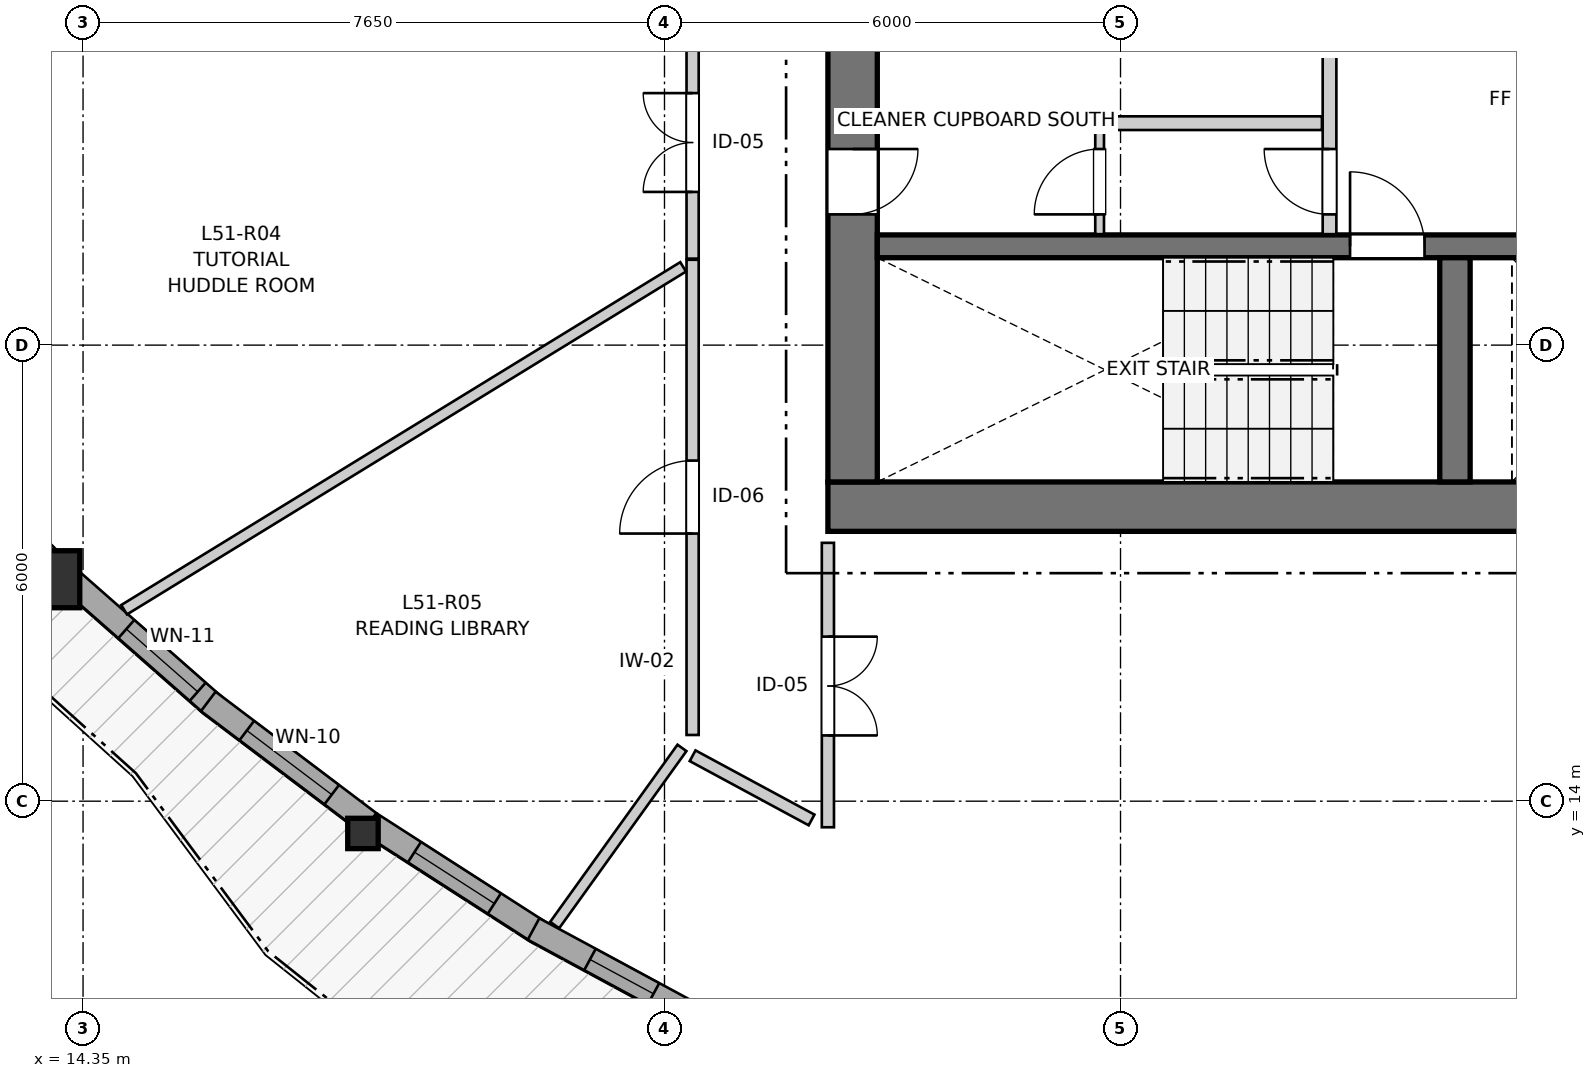
"""IFC4 building model, lengths in metres.
Left out: names, types, materials, properties, quantities, classifications, styles, units other than length and angle.
Written with IfcOpenShell. Run it as: python <this file> out.ifc"""

import sys

from ifc_helpers import new_model, si_unit, direction, frame, frame_2d, origin, origin_2d, place, context, subcontext, project, spatial, rectangle, i_section, extrude, source, transform, mapped, element, fill, save


model = new_model("IFC4")
c1 = context("Model", 3, precision=1e-05, world=origin(), true_north=direction((0.0, 1.0)))
c2 = subcontext(c1, "Body", "Model", "MODEL_VIEW")
j1 = project(units=[si_unit("LENGTHUNIT", "METRE"), si_unit("PLANEANGLEUNIT", "RADIAN")], contexts=[c1])
p1 = place(None, origin())
s1 = spatial("IfcSite", under=j1, at=p1, CompositionType="ELEMENT")
p2 = place(p1, origin())
s2 = spatial("IfcBuilding", under=s1, at=p2, CompositionType="ELEMENT")
p3 = place(p2, frame((0.0, 0.0, 171.4)))
s3 = spatial("IfcBuildingStorey", under=s2, at=p3, CompositionType="ELEMENT", Elevation=171.4)
p4 = place(p3, frame((24.15, 17.875, 0.0), z_axis=(0.0, 0.0, 1.0), x_axis=(1.0, 0.0, 0.0)))
e1 = element("IfcWall", 1, at=p4, inside=s3, PredefinedType="SHEAR", context=c2, shape_type="SweptSolid", body=[
    extrude(rectangle(XDim=12.4, YDim=0.65, at=frame_2d((6.2, 0.0))), origin(), (0.0, 0.0, 1.0), 2.95),
])
p5 = place(p3, frame((24.475, 33.8, 0.0), z_axis=(0.0, 0.0, 1.0), x_axis=(0.0, -1.0, 0.0)))
e2 = element("IfcWall", 2, at=p5, inside=s3, PredefinedType="SHEAR", context=c2, shape_type="SweptSolid", body=[
    extrude(rectangle(XDim=15.6, YDim=0.65, at=frame_2d((7.8, 0.0))), origin(), (0.0, 0.0, 1.0), 2.95),
])
p6 = place(p5, frame((7.05, 0.0, 0.0)))
e3 = element("IfcOpeningElement", 3, at=p6, cuts=e2, PredefinedType="OPENING", context=c2, shape_type="SweptSolid", body=[
    extrude(rectangle(XDim=1.5, YDim=2.15, at=frame_2d((0.75, 1.075))), frame((0.0, 0.335, 0.0), z_axis=(0.0, -1.0, 0.0), x_axis=(1.0, 0.0, 0.0)), (0.0, 0.0, 1.0), 0.67),
])
p7 = place(p5, frame((3.52, 0.0, 0.0)))
e4 = element("IfcOpeningElement", 4, at=p7, cuts=e2, PredefinedType="OPENING", context=c2, shape_type="SweptSolid", body=[
    extrude(rectangle(XDim=0.86, YDim=2.05, at=frame_2d((0.43, 1.025))), frame((0.0, 0.335, 0.0), z_axis=(0.0, -1.0, 0.0), x_axis=(1.0, 0.0, 0.0)), (0.0, 0.0, 1.0), 0.67),
])
p8 = place(p5, frame((11.22, 0.0, 0.0)))
e5 = element("IfcOpeningElement", 5, at=p8, cuts=e2, PredefinedType="OPENING", context=c2, shape_type="SweptSolid", body=[
    extrude(rectangle(XDim=0.86, YDim=2.05, at=frame_2d((0.43, 1.025))), frame((0.0, 0.335, 0.0), z_axis=(0.0, -1.0, 0.0), x_axis=(1.0, 0.0, 0.0)), (0.0, 0.0, 1.0), 0.67),
])
p9 = place(p3, frame((24.8, 21.3, 0.0), z_axis=(0.0, 0.0, 1.0), x_axis=(1.0, 0.0, 0.0)))
e6 = element("IfcWall", 6, at=p9, inside=s3, PredefinedType="SHEAR", context=c2, shape_type="SweptSolid", body=[
    extrude(rectangle(XDim=11.1, YDim=0.3, at=frame_2d((5.55, 0.0))), origin(), (0.0, 0.0, 1.0), 2.95),
])
p10 = place(p9, frame((6.22, 0.0, 0.0)))
e7 = element("IfcOpeningElement", 7, at=p10, cuts=e6, PredefinedType="OPENING", context=c2, shape_type="SweptSolid", body=[
    extrude(rectangle(XDim=0.98, YDim=2.15, at=frame_2d((0.49, 1.075))), frame((0.0, 0.16, 0.0), z_axis=(0.0, -1.0, 0.0), x_axis=(1.0, 0.0, 0.0)), (0.0, 0.0, 1.0), 0.32),
])
p11 = place(p9, frame((9.15, 0.0, 0.0)))
e8 = element("IfcOpeningElement", 8, at=p11, cuts=e6, PredefinedType="OPENING", context=c2, shape_type="SweptSolid", body=[
    extrude(rectangle(XDim=1.15, YDim=2.15, at=frame_2d((0.575, 1.075))), frame((0.0, 0.16, 0.0), z_axis=(0.0, -1.0, 0.0), x_axis=(1.0, 0.0, 0.0)), (0.0, 0.0, 1.0), 0.32),
])
p12 = place(p3, frame((32.4, 18.2, 0.0), z_axis=(0.0, 0.0, 1.0), x_axis=(0.0, 1.0, 0.0)))
e9 = element("IfcWall", 9, at=p12, inside=s3, PredefinedType="SHEAR", context=c2, shape_type="SweptSolid", body=[
    extrude(rectangle(XDim=2.95, YDim=0.4, at=frame_2d((1.475, 0.0))), origin(), (0.0, 0.0, 1.0), 2.95),
])
m1 = source(origin(), c2, "Body", "SweptSolid", [
    extrude(rectangle(XDim=0.75, YDim=0.75, at=origin_2d()), origin(), (0.0, 0.0, 1.0), 2.95),
])
p13 = place(p3, frame((13.932, 16.92, 0.0), z_axis=(0.0, 0.0, 1.0), x_axis=(1.0, 0.0, 0.0)))
e10 = element("IfcColumn", 10, at=p13, inside=s3, PredefinedType="COLUMN", context=c2, shape_type="MappedRepresentation", body=[
    mapped(m1, transform((0.0, 0.0, 0.0), x_axis=(1.0, 0.0, 0.0), y_axis=(0.0, 1.0, 0.0), z_axis=(0.0, 0.0, 1.0), scale=1.0)),
])
m2 = source(origin(), c2, "Body", "SweptSolid", [
    extrude(i_section(OverallWidth=0.401, OverallDepth=0.399, WebThickness=0.023, FlangeThickness=0.036, FilletRadius=0.015, at=origin_2d()), origin(), (0.0, 0.0, 1.0), 2.95),
])
p14 = place(p3, frame((18.033, 13.575, 0.0), z_axis=(0.0, 0.0, 1.0), x_axis=(1.0, 0.0, 0.0)))
e11 = element("IfcColumn", 11, at=p14, inside=s3, PredefinedType="PILASTER", context=c2, shape_type="MappedRepresentation", body=[
    mapped(m2, transform((0.0, 0.0, 0.0), x_axis=(1.0, 0.0, 0.0), y_axis=(0.0, 1.0, 0.0), z_axis=(0.0, 0.0, 1.0), scale=1.0)),
])
p15 = place(p3, frame((12.12, 18.989, 0.0), z_axis=(0.0, 0.0, 1.0), x_axis=(0.701501494422, -0.71266798253, 0.0)))
e12 = element("IfcWall", 12, at=p15, inside=s3, PredefinedType="SOLIDWALL", context=c2, shape_type="SweptSolid", body=[
    extrude(rectangle(XDim=2.58, YDim=0.32, at=frame_2d((1.29, 0.0))), origin(), (0.0, 0.0, 1.0), 2.53),
])
p16 = place(p15, frame((0.795, 0.0, 0.0)))
e13 = element("IfcOpeningElement", 13, at=p16, cuts=e12, PredefinedType="OPENING", context=c2, shape_type="SweptSolid", body=[
    extrude(rectangle(XDim=1.0, YDim=2.1, at=frame_2d((0.5, 1.05))), frame((0.0, 0.17, 0.0), z_axis=(0.0, -1.0, 0.0), x_axis=(1.0, 0.0, 0.0)), (0.0, 0.0, 1.0), 0.34),
])
p17 = place(p3, frame((14.161, 16.931, 0.0), z_axis=(0.0, 0.0, 1.0), x_axis=(0.751131625517, -0.660152468107, 0.0)))
e14 = element("IfcWall", 14, at=p17, inside=s3, PredefinedType="SOLIDWALL", context=c2, shape_type="SweptSolid", body=[
    extrude(rectangle(XDim=2.536, YDim=0.32, at=frame_2d((1.268, 0.0))), origin(), (0.0, 0.0, 1.0), 2.53),
])
p18 = place(p17, frame((1.01, 0.0, 0.82)))
e15 = element("IfcOpeningElement", 15, at=p18, cuts=e14, PredefinedType="OPENING", context=c2, shape_type="SweptSolid", body=[
    extrude(rectangle(XDim=1.25, YDim=1.35, at=frame_2d((0.625, 0.675))), frame((0.0, 0.17, 0.0), z_axis=(0.0, -1.0, 0.0), x_axis=(1.0, 0.0, 0.0)), (0.0, 0.0, 1.0), 0.34),
])
p19 = place(p3, frame((15.998, 15.313, 0.0), z_axis=(0.0, 0.0, 1.0), x_axis=(0.797995270696, -0.602663710494, 0.0)))
e16 = element("IfcWall", 16, at=p19, inside=s3, PredefinedType="SOLIDWALL", context=c2, shape_type="SweptSolid", body=[
    extrude(rectangle(XDim=2.651, YDim=0.32, at=frame_2d((1.325, 0.0))), origin(), (0.0, 0.0, 1.0), 2.53),
])
p20 = place(p19, frame((0.635, 0.0, 0.82)))
e17 = element("IfcOpeningElement", 17, at=p20, cuts=e16, PredefinedType="OPENING", context=c2, shape_type="SweptSolid", body=[
    extrude(rectangle(XDim=1.4, YDim=1.35, at=frame_2d((0.7, 0.675))), frame((0.0, 0.17, 0.0), z_axis=(0.0, -1.0, 0.0), x_axis=(1.0, 0.0, 0.0)), (0.0, 0.0, 1.0), 0.34),
])
p21 = place(p3, frame((18.136, 13.699, 0.0), z_axis=(0.0, 0.0, 1.0), x_axis=(0.841223609804, -0.540687375761, 0.0)))
e18 = element("IfcWall", 18, at=p21, inside=s3, PredefinedType="SOLIDWALL", context=c2, shape_type="SweptSolid", body=[
    extrude(rectangle(XDim=2.636, YDim=0.32, at=frame_2d((1.318, 0.0))), origin(), (0.0, 0.0, 1.0), 2.53),
])
p22 = place(p21, frame((0.683, 0.0, 0.82)))
e19 = element("IfcOpeningElement", 19, at=p22, cuts=e18, PredefinedType="OPENING", context=c2, shape_type="SweptSolid", body=[
    extrude(rectangle(XDim=1.25, YDim=1.35, at=frame_2d((0.625, 0.675))), frame((0.0, 0.17, 0.0), z_axis=(0.0, -1.0, 0.0), x_axis=(1.0, 0.0, 0.0)), (0.0, 0.0, 1.0), 0.34),
])
p23 = place(p3, frame((20.278, 12.319, 0.0), z_axis=(0.0, 0.0, 1.0), x_axis=(0.879825062943, -0.475297652653, 0.0)))
e20 = element("IfcWall", 20, at=p23, inside=s3, PredefinedType="SOLIDWALL", context=c2, shape_type="SweptSolid", body=[
    extrude(rectangle(XDim=2.491, YDim=0.32, at=frame_2d((1.245, 0.0))), origin(), (0.0, 0.0, 1.0), 2.53),
])
p24 = place(p23, frame((0.844, 0.0, 0.82)))
e21 = element("IfcOpeningElement", 21, at=p24, cuts=e20, PredefinedType="OPENING", context=c2, shape_type="SweptSolid", body=[
    extrude(rectangle(XDim=0.95, YDim=1.35, at=frame_2d((0.475, 0.675))), frame((0.0, 0.17, 0.0), z_axis=(0.0, -1.0, 0.0), x_axis=(1.0, 0.0, 0.0)), (0.0, 0.0, 1.0), 0.34),
])
p25 = place(p3, frame((30.75, 21.46, 0.0), z_axis=(0.0, 0.0, 1.0), x_axis=(0.0, 1.0, 0.0)))
e22 = element("IfcWall", 22, at=p25, inside=s3, PredefinedType="PARTITIONING", context=c2, shape_type="SweptSolid", body=[
    extrude(rectangle(XDim=3.11, YDim=0.18, at=frame_2d((1.555, 0.0))), origin(), (0.0, 0.0, 1.0), 2.95),
])
p26 = place(p25, frame((0.26, 0.0, 0.0)))
e23 = element("IfcOpeningElement", 23, at=p26, cuts=e22, PredefinedType="OPENING", context=c2, shape_type="SweptSolid", body=[
    extrude(rectangle(XDim=0.86, YDim=2.05, at=frame_2d((0.43, 1.025))), frame((0.0, 0.1, 0.0), z_axis=(0.0, -1.0, 0.0), x_axis=(1.0, 0.0, 0.0)), (0.0, 0.0, 1.0), 0.2),
])
p27 = place(p3, frame((24.81, 22.92, 0.0), z_axis=(0.0, 0.0, 1.0), x_axis=(1.0, 0.0, 0.0)))
e24 = element("IfcWall", 24, at=p27, inside=s3, PredefinedType="PARTITIONING", context=c2, shape_type="SweptSolid", body=[
    extrude(rectangle(XDim=5.84, YDim=0.18, at=frame_2d((2.92, 0.0))), origin(), (0.0, 0.0, 1.0), 2.95),
])
p28 = place(p3, frame((27.725, 21.46, 0.0), z_axis=(0.0, 0.0, 1.0), x_axis=(0.0, 1.0, 0.0)))
e25 = element("IfcWall", 25, at=p28, inside=s3, PredefinedType="PARTITIONING", context=c2, shape_type="SweptSolid", body=[
    extrude(rectangle(XDim=1.38, YDim=0.115, at=frame_2d((0.69, 0.0))), origin(), (0.0, 0.0, 1.0), 2.95),
])
p29 = place(p28, frame((0.26, 0.0, 0.0)))
e26 = element("IfcOpeningElement", 26, at=p29, cuts=e25, PredefinedType="OPENING", context=c2, shape_type="SweptSolid", body=[
    extrude(rectangle(XDim=0.86, YDim=2.05, at=frame_2d((0.43, 1.025))), frame((0.0, 0.067, 0.0), z_axis=(0.0, -1.0, 0.0), x_axis=(1.0, 0.0, 0.0)), (0.0, 0.0, 1.0), 0.135),
])
p30 = place(p3, frame((22.37, 14.871, 0.0), z_axis=(0.0, 0.0, 1.0), x_axis=(0.0, 1.0, 0.0)))
e27 = element("IfcWall", 27, at=p30, inside=s3, PredefinedType="PARTITIONING", context=c2, shape_type="SweptSolid", body=[
    extrude(rectangle(XDim=6.252, YDim=0.16, at=frame_2d((3.126, 0.0))), origin(), (0.0, 0.0, 1.0), 2.95),
])
p31 = place(p30, frame((2.65, 0.0, 0.0)))
e28 = element("IfcOpeningElement", 28, at=p31, cuts=e27, PredefinedType="OPENING", context=c2, shape_type="SweptSolid", body=[
    extrude(rectangle(XDim=0.96, YDim=2.1, at=frame_2d((0.48, 1.05))), frame((0.0, 0.09, 0.0), z_axis=(0.0, -1.0, 0.0), x_axis=(1.0, 0.0, 0.0)), (0.0, 0.0, 1.0), 0.18),
])
p32 = place(p3, frame((24.15, 17.399, 0.0), z_axis=(0.0, 0.0, 1.0), x_axis=(0.0, -1.0, 0.0)))
e29 = element("IfcWall", 29, at=p32, inside=s3, PredefinedType="PARTITIONING", context=c2, shape_type="SweptSolid", body=[
    extrude(rectangle(XDim=3.742, YDim=0.16, at=frame_2d((1.871, 0.0))), origin(), (0.0, 0.0, 1.0), 2.95),
])
p33 = place(p32, frame((1.234, 0.0, 0.0)))
e30 = element("IfcOpeningElement", 30, at=p33, cuts=e29, PredefinedType="OPENING", context=c2, shape_type="SweptSolid", body=[
    extrude(rectangle(XDim=1.3, YDim=2.1, at=frame_2d((0.65, 1.05))), frame((0.0, 0.09, 0.0), z_axis=(0.0, -1.0, 0.0), x_axis=(1.0, 0.0, 0.0)), (0.0, 0.0, 1.0), 0.18),
])
p34 = place(p3, frame((22.37, 21.138, 0.0), z_axis=(0.0, 0.0, 1.0), x_axis=(0.0, 1.0, 0.0)))
e31 = element("IfcWall", 31, at=p34, inside=s3, PredefinedType="PARTITIONING", context=c2, shape_type="SweptSolid", body=[
    extrude(rectangle(XDim=3.012, YDim=0.16, at=frame_2d((1.506, 0.0))), origin(), (0.0, 0.0, 1.0), 2.95),
])
p35 = place(p34, frame((0.877, 0.0, 0.0)))
e32 = element("IfcOpeningElement", 32, at=p35, cuts=e31, PredefinedType="OPENING", context=c2, shape_type="SweptSolid", body=[
    extrude(rectangle(XDim=1.3, YDim=2.1, at=frame_2d((0.65, 1.05))), frame((0.0, 0.09, 0.0), z_axis=(0.0, -1.0, 0.0), x_axis=(1.0, 0.0, 0.0)), (0.0, 0.0, 1.0), 0.18),
])
p36 = place(p3, frame((14.89, 16.519, 0.0), z_axis=(0.0, 0.0, 1.0), x_axis=(0.852461734542, 0.522789624171, 0.0)))
e33 = element("IfcWall", 33, at=p36, inside=s3, PredefinedType="PARTITIONING", context=c2, shape_type="SweptSolid", body=[
    extrude(rectangle(XDim=8.628, YDim=0.145, at=frame_2d((4.314, 0.0))), origin(), (0.0, 0.0, 1.0), 2.95),
])
p37 = place(p3, frame((20.555, 12.37, 0.0), z_axis=(0.0, 0.0, 1.0), x_axis=(0.583544912932, 0.812080867027, 0.0)))
e34 = element("IfcWall", 34, at=p37, inside=s3, PredefinedType="PARTITIONING", context=c2, shape_type="SweptSolid", body=[
    extrude(rectangle(XDim=2.87, YDim=0.145, at=frame_2d((1.435, 0.0))), origin(), (0.0, 0.0, 1.0), 2.95),
])
p38 = place(p3, frame((22.37, 14.598, 0.0), z_axis=(0.0, 0.0, 1.0), x_axis=(0.879928353623, -0.475106401231, 0.0)))
e35 = element("IfcWall", 35, at=p38, inside=s3, PredefinedType="PARTITIONING", context=c2, shape_type="SweptSolid", body=[
    extrude(rectangle(XDim=1.779, YDim=0.16, at=frame_2d((0.889, 0.0))), origin(), (0.0, 0.0, 1.0), 2.95),
])
m3 = source(origin(), c2, "Body", "SweptSolid", [
    extrude(rectangle(XDim=1.25, YDim=1.35, at=frame_2d((0.625, 0.675))), frame((0.0, 0.03, 0.0), z_axis=(0.0, -1.0, 0.0), x_axis=(1.0, 0.0, 0.0)), (0.0, 0.0, 1.0), 0.06),
])
p39 = place(p18, origin())
e36 = element("IfcWindow", 36, at=p39, inside=s3, PartitioningType="SINGLE_PANEL", PredefinedType="WINDOW", context=c2, shape_type="MappedRepresentation", body=[
    mapped(m3, transform((0.0, 0.0, 0.0), x_axis=(1.0, 0.0, 0.0), y_axis=(0.0, 1.0, 0.0), z_axis=(0.0, 0.0, 1.0), scale=1.0)),
])
fill(e15, e36)
m4 = source(origin(), c2, "Body", "SweptSolid", [
    extrude(rectangle(XDim=1.4, YDim=1.35, at=frame_2d((0.7, 0.675))), frame((0.0, 0.03, 0.0), z_axis=(0.0, -1.0, 0.0), x_axis=(1.0, 0.0, 0.0)), (0.0, 0.0, 1.0), 0.06),
])
p40 = place(p20, origin())
e37 = element("IfcWindow", 37, at=p40, inside=s3, PartitioningType="SINGLE_PANEL", PredefinedType="WINDOW", context=c2, shape_type="MappedRepresentation", body=[
    mapped(m4, transform((0.0, 0.0, 0.0), x_axis=(1.0, 0.0, 0.0), y_axis=(0.0, 1.0, 0.0), z_axis=(0.0, 0.0, 1.0), scale=1.0)),
])
fill(e17, e37)
p41 = place(p22, origin())
e38 = element("IfcWindow", 38, at=p41, inside=s3, PartitioningType="SINGLE_PANEL", PredefinedType="WINDOW", context=c2, shape_type="MappedRepresentation", body=[
    mapped(m3, transform((0.0, 0.0, 0.0), x_axis=(1.0, 0.0, 0.0), y_axis=(0.0, 1.0, 0.0), z_axis=(0.0, 0.0, 1.0), scale=1.0)),
])
fill(e19, e38)
m5 = source(origin(), c2, "Body", "SweptSolid", [
    extrude(rectangle(XDim=0.95, YDim=1.35, at=frame_2d((0.475, 0.675))), frame((0.0, 0.03, 0.0), z_axis=(0.0, -1.0, 0.0), x_axis=(1.0, 0.0, 0.0)), (0.0, 0.0, 1.0), 0.06),
])
p42 = place(p24, origin())
e39 = element("IfcWindow", 39, at=p42, inside=s3, PartitioningType="SINGLE_PANEL", PredefinedType="WINDOW", context=c2, shape_type="MappedRepresentation", body=[
    mapped(m5, transform((0.0, 0.0, 0.0), x_axis=(1.0, 0.0, 0.0), y_axis=(0.0, 1.0, 0.0), z_axis=(0.0, 0.0, 1.0), scale=1.0)),
])
fill(e21, e39)
m6 = source(origin(), c2, "Body", "SweptSolid", [
    extrude(rectangle(XDim=0.98, YDim=2.15, at=frame_2d((0.49, 1.075))), frame((0.0, 0.025, 0.0), z_axis=(0.0, -1.0, 0.0), x_axis=(1.0, 0.0, 0.0)), (0.0, 0.0, 1.0), 0.05),
])
p43 = place(p10, origin())
e40 = element("IfcDoor", 40, at=p43, inside=s3, OperationType="SINGLE_SWING_LEFT", PredefinedType="DOOR", context=c2, shape_type="MappedRepresentation", body=[
    mapped(m6, transform((0.0, 0.0, 0.0), x_axis=(1.0, 0.0, 0.0), y_axis=(0.0, 1.0, 0.0), z_axis=(0.0, 0.0, 1.0), scale=1.0)),
])
fill(e7, e40)
m7 = source(origin(), c2, "Body", "SweptSolid", [
    extrude(rectangle(XDim=0.86, YDim=2.05, at=frame_2d((0.43, 1.025))), frame((0.0, 0.025, 0.0), z_axis=(0.0, -1.0, 0.0), x_axis=(1.0, 0.0, 0.0)), (0.0, 0.0, 1.0), 0.05),
])
p44 = place(p8, origin())
e41 = element("IfcDoor", 41, at=p44, inside=s3, OperationType="SINGLE_SWING_LEFT", PredefinedType="DOOR", context=c2, shape_type="MappedRepresentation", body=[
    mapped(m7, transform((0.0, 0.0, 0.0), x_axis=(1.0, 0.0, 0.0), y_axis=(0.0, 1.0, 0.0), z_axis=(0.0, 0.0, 1.0), scale=1.0)),
])
fill(e5, e41)
p45 = place(p26, origin())
e42 = element("IfcDoor", 42, at=p45, inside=s3, OperationType="SINGLE_SWING_RIGHT", PredefinedType="DOOR", context=c2, shape_type="MappedRepresentation", body=[
    mapped(m7, transform((0.0, 0.0, 0.0), x_axis=(1.0, 0.0, 0.0), y_axis=(0.0, 1.0, 0.0), z_axis=(0.0, 0.0, 1.0), scale=1.0)),
])
fill(e23, e42)
p46 = place(p29, origin())
e43 = element("IfcDoor", 43, at=p46, inside=s3, OperationType="SINGLE_SWING_LEFT", PredefinedType="DOOR", context=c2, shape_type="MappedRepresentation", body=[
    mapped(m7, transform((0.0, 0.0, 0.0), x_axis=(1.0, 0.0, 0.0), y_axis=(0.0, 1.0, 0.0), z_axis=(0.0, 0.0, 1.0), scale=1.0)),
])
fill(e26, e43)
m8 = source(origin(), c2, "Body", "SweptSolid", [
    extrude(rectangle(XDim=0.96, YDim=2.1, at=frame_2d((0.48, 1.05))), frame((0.0, 0.025, 0.0), z_axis=(0.0, -1.0, 0.0), x_axis=(1.0, 0.0, 0.0)), (0.0, 0.0, 1.0), 0.05),
])
p47 = place(p31, origin())
e44 = element("IfcDoor", 44, at=p47, inside=s3, OperationType="SINGLE_SWING_LEFT", PredefinedType="DOOR", context=c2, shape_type="MappedRepresentation", body=[
    mapped(m8, transform((0.0, 0.0, 0.0), x_axis=(1.0, 0.0, 0.0), y_axis=(0.0, 1.0, 0.0), z_axis=(0.0, 0.0, 1.0), scale=1.0)),
])
fill(e28, e44)
m9 = source(origin(), c2, "Body", "SweptSolid", [
    extrude(rectangle(XDim=1.3, YDim=2.1, at=frame_2d((0.65, 1.05))), frame((0.0, 0.025, 0.0), z_axis=(0.0, -1.0, 0.0), x_axis=(1.0, 0.0, 0.0)), (0.0, 0.0, 1.0), 0.05),
])
p48 = place(p33, origin())
e45 = element("IfcDoor", 45, at=p48, inside=s3, OperationType="DOUBLE_DOOR_SINGLE_SWING", PredefinedType="DOOR", context=c2, shape_type="MappedRepresentation", body=[
    mapped(m9, transform((0.0, 0.0, 0.0), x_axis=(1.0, 0.0, 0.0), y_axis=(0.0, 1.0, 0.0), z_axis=(0.0, 0.0, 1.0), scale=1.0)),
])
fill(e30, e45)
p49 = place(p35, origin())
e46 = element("IfcDoor", 46, at=p49, inside=s3, OperationType="DOUBLE_DOOR_SINGLE_SWING", PredefinedType="DOOR", context=c2, shape_type="MappedRepresentation", body=[
    mapped(m9, transform((0.0, 0.0, 0.0), x_axis=(1.0, 0.0, 0.0), y_axis=(0.0, 1.0, 0.0), z_axis=(0.0, 0.0, 1.0), scale=1.0)),
])
fill(e32, e46)
save(model, sys.argv[1])
